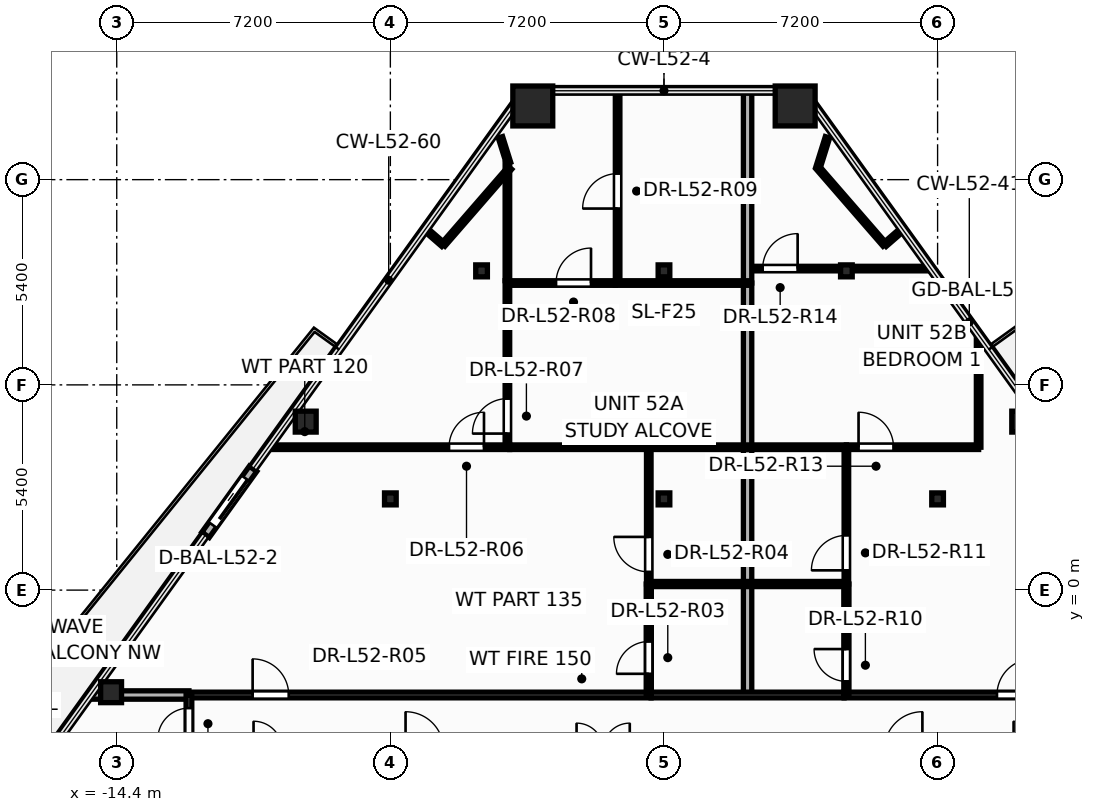
"""IFC4 building model, lengths in metres.
Left out: names, types, materials, properties, quantities, classifications, styles, units other than length and angle.
Written with IfcOpenShell. Run it as: python <this file> out.ifc"""

import sys

from ifc_helpers import new_model, si_unit, direction, frame, frame_2d, origin, origin_2d, place, context, subcontext, project, spatial, rectangle, hollow_rectangle, hollow_circle, i_section, extrude, element, fill, save


model = new_model("IFC4")
c1 = context("Model", 3, precision=1e-05, world=origin(), true_north=direction((0.0, 1.0)))
c2 = subcontext(c1, "Body", "Model", "MODEL_VIEW")
j1 = project(units=[si_unit("LENGTHUNIT", "METRE"), si_unit("PLANEANGLEUNIT", "RADIAN")], contexts=[c1])
p1 = place(None, origin())
s1 = spatial("IfcSite", under=j1, at=p1, CompositionType="ELEMENT")
p2 = place(p1, origin())
s2 = spatial("IfcBuilding", under=s1, at=p2, CompositionType="ELEMENT")
p3 = place(p2, frame((0.0, 0.0, 200.1)))
s3 = spatial("IfcBuildingStorey", under=s2, at=p3, CompositionType="ELEMENT", Elevation=200.1)
for number, where, z_axis, x_axis in (
    (1, (3.452, 12.739, 0.0), (0.0, 0.0, 1.0), (1.0, 0.0, 0.0)),
    (2, (-3.452, 12.739, 0.0), (0.0, 0.0, 1.0), (1.0, 0.0, 0.0)),
):
    element("IfcColumn", number, at=place(p3, frame(where, z_axis=z_axis, x_axis=x_axis)), inside=s3, PredefinedType="COLUMN", context=c2, shape_type="SweptSolid", body=[
        extrude(hollow_rectangle(XDim=1.05, YDim=1.05, WallThickness=0.045, at=origin_2d()), origin(), (0.0, 0.0, 1.0), 3.6),
    ])
for number, where, z_axis, x_axis in (
    (3, (9.427, 4.433, 0.0), (0.0, 0.0, 1.0), (1.0, 0.0, 0.0)),
    (4, (-9.427, 4.433, 0.0), (0.0, 0.0, 1.0), (1.0, 0.0, 0.0)),
    (5, (-14.549, -2.686, 0.0), (0.0, 0.0, 1.0), (1.0, 0.0, 0.0)),
):
    element("IfcColumn", number, at=place(p3, frame(where, z_axis=z_axis, x_axis=x_axis)), inside=s3, PredefinedType="COLUMN", context=c2, shape_type="SweptSolid", body=[
        extrude(hollow_circle(Radius=0.275, WallThickness=0.024, at=origin_2d()), origin(), (0.0, 0.0, 1.0), 3.6),
    ])
for number, where, z_axis, x_axis in (
    (6, (-7.2, 2.4, 0.0), (0.0, 0.0, 1.0), (1.0, 0.0, 0.0)),
    (7, (0.0, 2.4, 0.0), (0.0, 0.0, 1.0), (1.0, 0.0, 0.0)),
    (8, (7.2, 2.4, 0.0), (0.0, 0.0, 1.0), (1.0, 0.0, 0.0)),
    (9, (-4.8, 8.4, 0.0), (0.0, 0.0, 1.0), (1.0, 0.0, 0.0)),
    (10, (0.0, 8.4, 0.0), (0.0, 0.0, 1.0), (1.0, 0.0, 0.0)),
    (11, (4.8, 8.4, 0.0), (0.0, 0.0, 1.0), (1.0, 0.0, 0.0)),
):
    element("IfcColumn", number, at=place(p3, frame(where, z_axis=z_axis, x_axis=x_axis)), inside=s3, PredefinedType="COLUMN", context=c2, shape_type="SweptSolid", body=[
        extrude(i_section(OverallWidth=0.307, OverallDepth=0.314, WebThickness=0.012, FlangeThickness=0.019, at=origin_2d()), origin(), (0.0, 0.0, 1.0), 3.6),
    ])
p4 = place(p3, frame((-10.813, 3.192, -0.015), z_axis=(0.0, 0.0, 1.0), x_axis=(-0.583965085393, -0.811778774693, 0.0)))
e12 = element("IfcWall", 12, at=p4, inside=s3, PredefinedType="STANDARD", context=c2, shape_type="SweptSolid", body=[
    extrude(rectangle(XDim=2.14, YDim=0.24, at=frame_2d((1.07, 0.0))), origin(), (0.0, 0.0, 1.0), 2.802),
])
p5 = place(p4, frame((0.32, 0.0, 0.015)))
e13 = element("IfcOpeningElement", 13, at=p5, cuts=e12, PredefinedType="OPENING", context=c2, shape_type="SweptSolid", body=[
    extrude(rectangle(XDim=1.506, YDim=2.204, at=frame_2d((0.75, 1.102))), frame((0.0, 0.13, 0.0), z_axis=(0.0, -1.0, 0.0), x_axis=(1.0, 0.0, 0.0)), (0.0, 0.0, 1.0), 0.26),
])
p6 = place(p3, frame((-12.5, -2.76, 0.0), z_axis=(0.0, 0.0, 1.0), x_axis=(1.0, 0.0, 0.0)))
e14 = element("IfcWall", 14, at=p6, inside=s3, PredefinedType="PARTITIONING", context=c2, shape_type="SweptSolid", body=[
    extrude(rectangle(XDim=12.16, YDim=0.15, at=frame_2d((6.08, 0.0))), origin(), (0.0, 0.0, 1.0), 2.32),
])
p7 = place(p6, frame((1.676, 0.0, 0.0)))
e15 = element("IfcOpeningElement", 15, at=p7, cuts=e14, PredefinedType="OPENING", context=c2, shape_type="SweptSolid", body=[
    extrude(rectangle(XDim=0.956, YDim=2.104, at=frame_2d((0.475, 1.052))), frame((0.0, 0.085, 0.0), z_axis=(0.0, -1.0, 0.0), x_axis=(1.0, 0.0, 0.0)), (0.0, 0.0, 1.0), 0.17),
])
p8 = place(p3, frame((4.74, -2.76, 0.0), z_axis=(0.0, 0.0, 1.0), x_axis=(1.0, 0.0, 0.0)))
e16 = element("IfcWall", 16, at=p8, inside=s3, PredefinedType="PARTITIONING", context=c2, shape_type="SweptSolid", body=[
    extrude(rectangle(XDim=7.76, YDim=0.15, at=frame_2d((3.88, 0.0))), origin(), (0.0, 0.0, 1.0), 2.32),
])
p9 = place(p8, frame((4.022, 0.0, 0.0)))
e17 = element("IfcOpeningElement", 17, at=p9, cuts=e16, PredefinedType="OPENING", context=c2, shape_type="SweptSolid", body=[
    extrude(rectangle(XDim=0.956, YDim=2.104, at=frame_2d((0.475, 1.052))), frame((0.0, 0.085, 0.0), z_axis=(0.0, -1.0, 0.0), x_axis=(1.0, 0.0, 0.0)), (0.0, 0.0, 1.0), 0.17),
])
p10 = place(p3, frame((-10.404, 3.76, 0.0), z_axis=(0.0, 0.0, 1.0), x_axis=(1.0, 0.0, 0.0)))
e18 = element("IfcWall", 18, at=p10, inside=s3, PredefinedType="PARTITIONING", context=c2, shape_type="SweptSolid", body=[
    extrude(rectangle(XDim=6.344, YDim=0.12, at=frame_2d((3.172, 0.0))), origin(), (0.0, 0.0, 1.0), 2.32),
])
p11 = place(p10, frame((4.748, 0.0, 0.0)))
e19 = element("IfcOpeningElement", 19, at=p11, cuts=e18, PredefinedType="OPENING", context=c2, shape_type="SweptSolid", body=[
    extrude(rectangle(XDim=0.926, YDim=2.104, at=frame_2d((0.46, 1.052))), frame((0.0, 0.07, 0.0), z_axis=(0.0, -1.0, 0.0), x_axis=(1.0, 0.0, 0.0)), (0.0, 0.0, 1.0), 0.14),
])
p12 = place(p3, frame((-1.22, 8.08, 0.0), z_axis=(0.0, 0.0, 1.0), x_axis=(0.0, 1.0, 0.0)))
e20 = element("IfcWall", 20, at=p12, inside=s3, PredefinedType="PARTITIONING", context=c2, shape_type="SweptSolid", body=[
    extrude(rectangle(XDim=5.059, YDim=0.12, at=frame_2d((2.529, 0.0))), origin(), (0.0, 0.0, 1.0), 2.32),
])
p13 = place(p12, frame((1.959, 0.0, 0.0)))
e21 = element("IfcOpeningElement", 21, at=p13, cuts=e20, PredefinedType="OPENING", context=c2, shape_type="SweptSolid", body=[
    extrude(rectangle(XDim=0.926, YDim=2.104, at=frame_2d((0.46, 1.052))), frame((0.0, 0.07, 0.0), z_axis=(0.0, -1.0, 0.0), x_axis=(1.0, 0.0, 0.0)), (0.0, 0.0, 1.0), 0.14),
])
p14 = place(p3, frame((2.2, 8.46, 0.0), z_axis=(0.0, 0.0, 1.0), x_axis=(1.0, 0.0, 0.0)))
e22 = element("IfcWall", 22, at=p14, inside=s3, PredefinedType="PARTITIONING", context=c2, shape_type="SweptSolid", body=[
    extrude(rectangle(XDim=4.823, YDim=0.12, at=frame_2d((2.412, 0.0))), origin(), (0.0, 0.0, 1.0), 2.32),
])
p15 = place(p14, frame((0.397, 0.0, 0.0)))
e23 = element("IfcOpeningElement", 23, at=p15, cuts=e22, PredefinedType="OPENING", context=c2, shape_type="SweptSolid", body=[
    extrude(rectangle(XDim=0.926, YDim=2.104, at=frame_2d((0.46, 1.052))), frame((0.0, 0.07, 0.0), z_axis=(0.0, -1.0, 0.0), x_axis=(1.0, 0.0, 0.0)), (0.0, 0.0, 1.0), 0.14),
])
p16 = place(p3, frame((2.2, 8.08, 0.0), z_axis=(0.0, 0.0, 1.0), x_axis=(0.0, 1.0, 0.0)))
e24 = element("IfcWall", 24, at=p16, inside=s3, PredefinedType="PARTITIONING", context=c2, shape_type="SweptSolid", body=[
    extrude(rectangle(XDim=5.059, YDim=0.22, at=frame_2d((2.529, 0.0))), origin(), (0.0, 0.0, 1.0), 2.32),
])
p17 = place(p3, frame((-4.12, 3.76, 0.0), z_axis=(0.0, 0.0, 1.0), x_axis=(0.0, 1.0, 0.0)))
e25 = element("IfcWall", 25, at=p17, inside=s3, PredefinedType="PARTITIONING", context=c2, shape_type="SweptSolid", body=[
    extrude(rectangle(XDim=4.38, YDim=0.12, at=frame_2d((2.19, 0.0))), origin(), (0.0, 0.0, 1.0), 3.345),
])
p18 = place(p17, frame((0.358, 0.0, 0.0)))
e26 = element("IfcOpeningElement", 26, at=p18, cuts=e25, PredefinedType="OPENING", context=c2, shape_type="SweptSolid", body=[
    extrude(rectangle(XDim=0.926, YDim=2.104, at=frame_2d((0.46, 1.052))), frame((0.0, 0.07, 0.0), z_axis=(0.0, -1.0, 0.0), x_axis=(1.0, 0.0, 0.0)), (0.0, 0.0, 1.0), 0.14),
])
p19 = place(p3, frame((2.2, -2.76, 0.0), z_axis=(0.0, 0.0, 1.0), x_axis=(0.0, 1.0, 0.0)))
e27 = element("IfcWall", 27, at=p19, inside=s3, PredefinedType="PARTITIONING", context=c2, shape_type="SweptSolid", body=[
    extrude(rectangle(XDim=10.84, YDim=0.22, at=frame_2d((5.42, 0.0))), origin(), (0.0, 0.0, 1.0), 2.32),
])
p20 = place(p3, frame((-4.058, 3.76, 0.0), z_axis=(0.0, 0.0, 1.0), x_axis=(1.0, 0.0, 0.0)))
e28 = element("IfcWall", 28, at=p20, inside=s3, PredefinedType="PARTITIONING", context=c2, shape_type="SweptSolid", body=[
    extrude(rectangle(XDim=8.858, YDim=0.12, at=frame_2d((4.429, 0.0))), origin(), (0.0, 0.0, 1.0), 2.32),
])
p21 = place(p3, frame((-0.4, 0.16, 0.0), z_axis=(0.0, 0.0, 1.0), x_axis=(0.0, 1.0, 0.0)))
e29 = element("IfcWall", 29, at=p21, inside=s3, PredefinedType="PARTITIONING", context=c2, shape_type="SweptSolid", body=[
    extrude(rectangle(XDim=3.6, YDim=0.12, at=frame_2d((1.8, 0.0))), origin(), (0.0, 0.0, 1.0), 2.32),
])
p22 = place(p21, frame((0.32, 0.0, 0.0)))
e30 = element("IfcOpeningElement", 30, at=p22, cuts=e29, PredefinedType="OPENING", context=c2, shape_type="SweptSolid", body=[
    extrude(rectangle(XDim=0.926, YDim=2.104, at=frame_2d((0.46, 1.052))), frame((0.0, 0.07, 0.0), z_axis=(0.0, -1.0, 0.0), x_axis=(1.0, 0.0, 0.0)), (0.0, 0.0, 1.0), 0.14),
])
p23 = place(p3, frame((4.8, 0.16, 0.0), z_axis=(0.0, 0.0, 1.0), x_axis=(0.0, 1.0, 0.0)))
e31 = element("IfcWall", 31, at=p23, inside=s3, PredefinedType="PARTITIONING", context=c2, shape_type="SweptSolid", body=[
    extrude(rectangle(XDim=3.6, YDim=0.12, at=frame_2d((1.8, 0.0))), origin(), (0.0, 0.0, 1.0), 2.32),
])
p24 = place(p23, frame((0.36, 0.0, 0.0)))
e32 = element("IfcOpeningElement", 32, at=p24, cuts=e31, PredefinedType="OPENING", context=c2, shape_type="SweptSolid", body=[
    extrude(rectangle(XDim=0.926, YDim=2.104, at=frame_2d((0.46, 1.052))), frame((0.0, 0.07, 0.0), z_axis=(0.0, -1.0, 0.0), x_axis=(1.0, 0.0, 0.0)), (0.0, 0.0, 1.0), 0.14),
])
p25 = place(p3, frame((-1.28, 8.08, 0.0), z_axis=(0.0, 0.0, 1.0), x_axis=(1.0, 0.0, 0.0)))
e33 = element("IfcWall", 33, at=p25, inside=s3, PredefinedType="PARTITIONING", context=c2, shape_type="SweptSolid", body=[
    extrude(rectangle(XDim=3.48, YDim=0.12, at=frame_2d((1.74, 0.0))), origin(), (0.0, 0.0, 1.0), 2.32),
])
p26 = place(p3, frame((4.8, 3.76, 0.0), z_axis=(0.0, 0.0, 1.0), x_axis=(1.0, 0.0, 0.0)))
e34 = element("IfcWall", 34, at=p26, inside=s3, PredefinedType="PARTITIONING", context=c2, shape_type="SweptSolid", body=[
    extrude(rectangle(XDim=3.48, YDim=0.12, at=frame_2d((1.74, 0.0))), origin(), (0.0, 0.0, 1.0), 2.32),
])
p27 = place(p26, frame((0.32, 0.0, 0.0)))
e35 = element("IfcOpeningElement", 35, at=p27, cuts=e34, PredefinedType="OPENING", context=c2, shape_type="SweptSolid", body=[
    extrude(rectangle(XDim=0.926, YDim=2.104, at=frame_2d((0.46, 1.052))), frame((0.0, 0.07, 0.0), z_axis=(0.0, -1.0, 0.0), x_axis=(1.0, 0.0, 0.0)), (0.0, 0.0, 1.0), 0.14),
])
p28 = place(p3, frame((-4.12, 8.142, 0.0), z_axis=(0.0, 0.0, 1.0), x_axis=(0.0, 1.0, 0.0)))
e36 = element("IfcWall", 36, at=p28, inside=s3, PredefinedType="PARTITIONING", context=c2, shape_type="SweptSolid", body=[
    extrude(rectangle(XDim=3.098, YDim=0.12, at=frame_2d((1.549, 0.0))), origin(), (0.0, 0.0, 1.0), 2.32),
])
p29 = place(p3, frame((-4.12, 8.08, 0.0), z_axis=(0.0, 0.0, 1.0), x_axis=(1.0, 0.0, 0.0)))
e37 = element("IfcWall", 37, at=p29, inside=s3, PredefinedType="PARTITIONING", context=c2, shape_type="SweptSolid", body=[
    extrude(rectangle(XDim=2.838, YDim=0.12, at=frame_2d((1.419, 0.0))), origin(), (0.0, 0.0, 1.0), 2.964),
])
p30 = place(p29, frame((1.28, 0.0, 0.0)))
e38 = element("IfcOpeningElement", 38, at=p30, cuts=e37, PredefinedType="OPENING", context=c2, shape_type="SweptSolid", body=[
    extrude(rectangle(XDim=0.926, YDim=2.104, at=frame_2d((0.46, 1.052))), frame((0.0, 0.07, 0.0), z_axis=(0.0, -1.0, 0.0), x_axis=(1.0, 0.0, 0.0)), (0.0, 0.0, 1.0), 0.14),
])
p31 = place(p3, frame((8.28, 3.76, 0.0), z_axis=(0.0, 0.0, 1.0), x_axis=(0.0, 1.0, 0.0)))
e39 = element("IfcWall", 39, at=p31, inside=s3, PredefinedType="PARTITIONING", context=c2, shape_type="SweptSolid", body=[
    extrude(rectangle(XDim=2.953, YDim=0.12, at=frame_2d((1.477, 0.0))), origin(), (0.0, 0.0, 1.0), 2.32),
])
p32 = place(p3, frame((-0.4, -2.76, 0.0), z_axis=(0.0, 0.0, 1.0), x_axis=(0.0, 1.0, 0.0)))
e40 = element("IfcWall", 40, at=p32, inside=s3, PredefinedType="PARTITIONING", context=c2, shape_type="SweptSolid", body=[
    extrude(rectangle(XDim=2.92, YDim=0.135, at=frame_2d((1.46, 0.0))), origin(), (0.0, 0.0, 1.0), 3.345),
])
p33 = place(p32, frame((0.558, 0.0, 0.0)))
e41 = element("IfcOpeningElement", 41, at=p33, cuts=e40, PredefinedType="OPENING", context=c2, shape_type="SweptSolid", body=[
    extrude(rectangle(XDim=0.856, YDim=2.104, at=frame_2d((0.425, 1.052))), frame((0.0, 0.078, 0.0), z_axis=(0.0, -1.0, 0.0), x_axis=(1.0, 0.0, 0.0)), (0.0, 0.0, 1.0), 0.155),
])
p34 = place(p3, frame((4.8, -2.76, 0.0), z_axis=(0.0, 0.0, 1.0), x_axis=(0.0, 1.0, 0.0)))
e42 = element("IfcWall", 42, at=p34, inside=s3, PredefinedType="PARTITIONING", context=c2, shape_type="SweptSolid", body=[
    extrude(rectangle(XDim=2.92, YDim=0.135, at=frame_2d((1.46, 0.0))), origin(), (0.0, 0.0, 1.0), 3.345),
])
p35 = place(p34, frame((0.359, 0.0, 0.0)))
e43 = element("IfcOpeningElement", 43, at=p35, cuts=e42, PredefinedType="OPENING", context=c2, shape_type="SweptSolid", body=[
    extrude(rectangle(XDim=0.856, YDim=2.104, at=frame_2d((0.425, 1.052))), frame((0.0, 0.078, 0.0), z_axis=(0.0, -1.0, 0.0), x_axis=(1.0, 0.0, 0.0)), (0.0, 0.0, 1.0), 0.155),
])
p36 = place(p3, frame((-0.338, -2.76, 0.0), z_axis=(0.0, 0.0, 1.0), x_axis=(1.0, 0.0, 0.0)))
e44 = element("IfcWall", 44, at=p36, inside=s3, PredefinedType="PARTITIONING", context=c2, shape_type="SweptSolid", body=[
    extrude(rectangle(XDim=5.076, YDim=0.15, at=frame_2d((2.538, 0.0))), origin(), (0.0, 0.0, 1.0), 2.32),
])
for number, where, z_axis, x_axis in (
    (45, (-4.051, 11.112, 0.0), (0.0, 0.0, 1.0), (-0.656, -0.755, 0.0)),
    (46, (5.809, 9.088, 0.0), (0.0, 0.0, 1.0), (-0.656, 0.755, 0.0)),
):
    element("IfcWall", number, at=place(p3, frame(where, z_axis=z_axis, x_axis=x_axis)), inside=s3, PredefinedType="PARTITIONING", context=c2, shape_type="SweptSolid", body=[
        extrude(rectangle(XDim=2.68, YDim=0.12, at=frame_2d((1.34, 0.0))), origin(), (0.0, 0.0, 1.0), 2.32),
    ])
p37 = place(p3, frame((-0.4, 0.16, 0.0), z_axis=(0.0, 0.0, 1.0), x_axis=(1.0, 0.0, 0.0)))
e47 = element("IfcWall", 47, at=p37, inside=s3, PredefinedType="PARTITIONING", context=c2, shape_type="SweptSolid", body=[
    extrude(rectangle(XDim=5.2, YDim=0.135, at=frame_2d((2.6, 0.0))), origin(), (0.0, 0.0, 1.0), 2.32),
])
p38 = place(p3, frame((-15.095, -2.76, 0.0), z_axis=(0.0, 0.0, 1.0), x_axis=(1.0, 0.0, 0.0)))
e48 = element("IfcWall", 48, at=p38, inside=s3, PredefinedType="PARTITIONING", context=c2, shape_type="SweptSolid", body=[
    extrude(rectangle(XDim=2.595, YDim=0.22, at=frame_2d((1.297, 0.0))), origin(), (0.0, 0.0, 1.0), 2.32),
])
p39 = place(p3, frame((-12.5, -4.24, 0.0), z_axis=(0.0, 0.0, 1.0), x_axis=(0.0, 1.0, 0.0)))
e49 = element("IfcWall", 49, at=p39, inside=s3, PredefinedType="PARTITIONING", context=c2, shape_type="SweptSolid", body=[
    extrude(rectangle(XDim=1.48, YDim=0.15, at=frame_2d((0.74, 0.0))), origin(), (0.0, 0.0, 1.0), 2.32),
])
p40 = place(p39, frame((0.315, 0.0, 0.0)))
e50 = element("IfcOpeningElement", 50, at=p40, cuts=e49, PredefinedType="OPENING", context=c2, shape_type="SweptSolid", body=[
    extrude(rectangle(XDim=0.826, YDim=2.104, at=frame_2d((0.41, 1.052))), frame((0.0, 0.085, 0.0), z_axis=(0.0, -1.0, 0.0), x_axis=(1.0, 0.0, 0.0)), (0.0, 0.0, 1.0), 0.17),
])
p41 = place(p3, frame((-4.303, 11.917, 0.0), z_axis=(0.0, 0.0, 1.0), x_axis=(0.298452005803, -0.954424643559, 0.0)))
e51 = element("IfcWall", 51, at=p41, inside=s3, PredefinedType="PARTITIONING", context=c2, shape_type="SweptSolid", body=[
    extrude(rectangle(XDim=0.707, YDim=0.12, at=frame_2d((0.354, 0.0))), origin(), (0.0, 0.0, 1.0), 2.787),
])
p42 = place(p3, frame((4.051, 11.112, 0.0), z_axis=(0.0, 0.0, 1.0), x_axis=(0.298538782318, 0.954397503901, 0.0)))
e52 = element("IfcWall", 52, at=p42, inside=s3, PredefinedType="PARTITIONING", context=c2, shape_type="SweptSolid", body=[
    extrude(rectangle(XDim=0.843, YDim=0.12, at=frame_2d((0.421, 0.0))), origin(), (0.0, 0.0, 1.0), 2.32),
])
for number, where, z_axis, x_axis in (
    (53, (-5.809, 9.088, 0.0), (0.0, 0.0, 1.0), (-0.755, 0.655, 0.0)),
    (54, (6.271, 9.489, 0.0), (0.0, 0.0, 1.0), (-0.755, -0.655, 0.0)),
):
    element("IfcWall", number, at=place(p3, frame(where, z_axis=z_axis, x_axis=x_axis)), inside=s3, PredefinedType="PARTITIONING", context=c2, shape_type="SweptSolid", body=[
        extrude(rectangle(XDim=0.612, YDim=0.12, at=frame_2d((0.306, 0.0))), origin(), (0.0, 0.0, 1.0), 2.787),
    ])
p43 = place(p5, origin())
e55 = element("IfcDoor", 55, at=p43, inside=s3, OperationType="SLIDING_TO_RIGHT", PredefinedType="DOOR", context=c2, shape_type="SweptSolid", body=[
    extrude(rectangle(XDim=1.5, YDim=2.2, at=frame_2d((0.75, 1.1))), frame((0.0, 0.025, 0.0), z_axis=(0.0, -1.0, 0.0), x_axis=(1.0, 0.0, 0.0)), (0.0, 0.0, 1.0), 0.05),
])
fill(e13, e55)
p44 = place(p40, origin())
e56 = element("IfcDoor", 56, at=p44, inside=s3, OperationType="SINGLE_SWING_LEFT", PredefinedType="DOOR", context=c2, shape_type="SweptSolid", body=[
    extrude(rectangle(XDim=0.82, YDim=2.1, at=frame_2d((0.41, 1.05))), frame((0.0, 0.025, 0.0), z_axis=(0.0, -1.0, 0.0), x_axis=(1.0, 0.0, 0.0)), (0.0, 0.0, 1.0), 0.05),
])
fill(e50, e56)
p45 = place(p33, origin())
e57 = element("IfcDoor", 57, at=p45, inside=s3, OperationType="SINGLE_SWING_LEFT", PredefinedType="DOOR", context=c2, shape_type="SweptSolid", body=[
    extrude(rectangle(XDim=0.85, YDim=2.1, at=frame_2d((0.425, 1.05))), frame((0.0, 0.025, 0.0), z_axis=(0.0, -1.0, 0.0), x_axis=(1.0, 0.0, 0.0)), (0.0, 0.0, 1.0), 0.05),
])
fill(e41, e57)
p46 = place(p22, origin())
e58 = element("IfcDoor", 58, at=p46, inside=s3, OperationType="SINGLE_SWING_RIGHT", PredefinedType="DOOR", context=c2, shape_type="SweptSolid", body=[
    extrude(rectangle(XDim=0.92, YDim=2.1, at=frame_2d((0.46, 1.05))), frame((0.0, 0.025, 0.0), z_axis=(0.0, -1.0, 0.0), x_axis=(1.0, 0.0, 0.0)), (0.0, 0.0, 1.0), 0.05),
])
fill(e30, e58)
p47 = place(p7, origin())
e59 = element("IfcDoor", 59, at=p47, inside=s3, OperationType="SINGLE_SWING_LEFT", PredefinedType="DOOR", context=c2, shape_type="SweptSolid", body=[
    extrude(rectangle(XDim=0.95, YDim=2.1, at=frame_2d((0.475, 1.05))), frame((0.0, 0.025, 0.0), z_axis=(0.0, -1.0, 0.0), x_axis=(1.0, 0.0, 0.0)), (0.0, 0.0, 1.0), 0.05),
])
fill(e15, e59)
p48 = place(p11, origin())
e60 = element("IfcDoor", 60, at=p48, inside=s3, OperationType="SINGLE_SWING_RIGHT", PredefinedType="DOOR", context=c2, shape_type="SweptSolid", body=[
    extrude(rectangle(XDim=0.92, YDim=2.1, at=frame_2d((0.46, 1.05))), frame((0.0, 0.025, 0.0), z_axis=(0.0, -1.0, 0.0), x_axis=(1.0, 0.0, 0.0)), (0.0, 0.0, 1.0), 0.05),
])
fill(e19, e60)
p49 = place(p18, origin())
e61 = element("IfcDoor", 61, at=p49, inside=s3, OperationType="SINGLE_SWING_LEFT", PredefinedType="DOOR", context=c2, shape_type="SweptSolid", body=[
    extrude(rectangle(XDim=0.92, YDim=2.1, at=frame_2d((0.46, 1.05))), frame((0.0, 0.025, 0.0), z_axis=(0.0, -1.0, 0.0), x_axis=(1.0, 0.0, 0.0)), (0.0, 0.0, 1.0), 0.05),
])
fill(e26, e61)
p50 = place(p30, origin())
e62 = element("IfcDoor", 62, at=p50, inside=s3, OperationType="SINGLE_SWING_RIGHT", PredefinedType="DOOR", context=c2, shape_type="SweptSolid", body=[
    extrude(rectangle(XDim=0.92, YDim=2.1, at=frame_2d((0.46, 1.05))), frame((0.0, 0.025, 0.0), z_axis=(0.0, -1.0, 0.0), x_axis=(1.0, 0.0, 0.0)), (0.0, 0.0, 1.0), 0.05),
])
fill(e38, e62)
p51 = place(p13, origin())
e63 = element("IfcDoor", 63, at=p51, inside=s3, OperationType="SINGLE_SWING_LEFT", PredefinedType="DOOR", context=c2, shape_type="SweptSolid", body=[
    extrude(rectangle(XDim=0.92, YDim=2.1, at=frame_2d((0.46, 1.05))), frame((0.0, 0.025, 0.0), z_axis=(0.0, -1.0, 0.0), x_axis=(1.0, 0.0, 0.0)), (0.0, 0.0, 1.0), 0.05),
])
fill(e21, e63)
p52 = place(p35, origin())
e64 = element("IfcDoor", 64, at=p52, inside=s3, OperationType="SINGLE_SWING_RIGHT", PredefinedType="DOOR", context=c2, shape_type="SweptSolid", body=[
    extrude(rectangle(XDim=0.85, YDim=2.1, at=frame_2d((0.425, 1.05))), frame((0.0, 0.025, 0.0), z_axis=(0.0, -1.0, 0.0), x_axis=(1.0, 0.0, 0.0)), (0.0, 0.0, 1.0), 0.05),
])
fill(e43, e64)
p53 = place(p24, origin())
e65 = element("IfcDoor", 65, at=p53, inside=s3, OperationType="SINGLE_SWING_LEFT", PredefinedType="DOOR", context=c2, shape_type="SweptSolid", body=[
    extrude(rectangle(XDim=0.92, YDim=2.1, at=frame_2d((0.46, 1.05))), frame((0.0, 0.025, 0.0), z_axis=(0.0, -1.0, 0.0), x_axis=(1.0, 0.0, 0.0)), (0.0, 0.0, 1.0), 0.05),
])
fill(e32, e65)
p54 = place(p9, origin())
e66 = element("IfcDoor", 66, at=p54, inside=s3, OperationType="SINGLE_SWING_RIGHT", PredefinedType="DOOR", context=c2, shape_type="SweptSolid", body=[
    extrude(rectangle(XDim=0.95, YDim=2.1, at=frame_2d((0.475, 1.05))), frame((0.0, 0.025, 0.0), z_axis=(0.0, -1.0, 0.0), x_axis=(1.0, 0.0, 0.0)), (0.0, 0.0, 1.0), 0.05),
])
fill(e17, e66)
p55 = place(p27, origin())
e67 = element("IfcDoor", 67, at=p55, inside=s3, OperationType="SINGLE_SWING_LEFT", PredefinedType="DOOR", context=c2, shape_type="SweptSolid", body=[
    extrude(rectangle(XDim=0.92, YDim=2.1, at=frame_2d((0.46, 1.05))), frame((0.0, 0.025, 0.0), z_axis=(0.0, -1.0, 0.0), x_axis=(1.0, 0.0, 0.0)), (0.0, 0.0, 1.0), 0.05),
])
fill(e35, e67)
p56 = place(p15, origin())
e68 = element("IfcDoor", 68, at=p56, inside=s3, OperationType="SINGLE_SWING_RIGHT", PredefinedType="DOOR", context=c2, shape_type="SweptSolid", body=[
    extrude(rectangle(XDim=0.92, YDim=2.1, at=frame_2d((0.46, 1.05))), frame((0.0, 0.025, 0.0), z_axis=(0.0, -1.0, 0.0), x_axis=(1.0, 0.0, 0.0)), (0.0, 0.0, 1.0), 0.05),
])
fill(e23, e68)
save(model, sys.argv[1])
